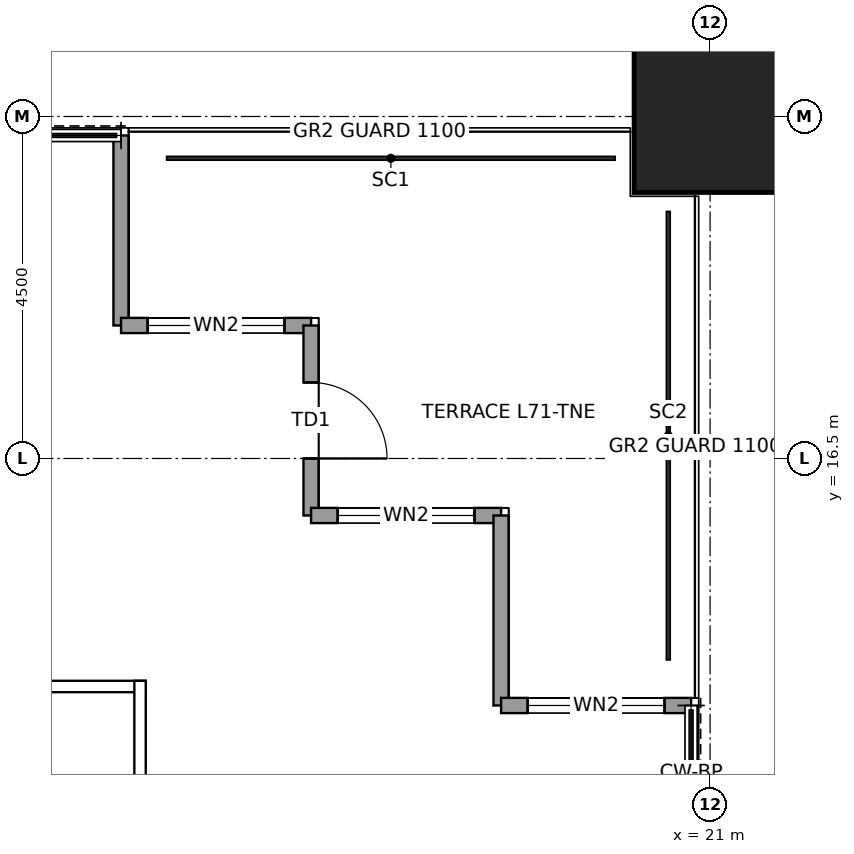
"""IFC4 building model, lengths in metres.
Left out: names, types, materials, properties, quantities, classifications, styles, units other than length and angle.
Written with IfcOpenShell. Run it as: python <this file> out.ifc"""

import sys

from ifc_helpers import new_model, si_unit, direction, frame, frame_2d, origin, origin_2d, place, context, subcontext, project, spatial, rectangle, hollow_rectangle, extrude, element, fill, save


model = new_model("IFC4")
c1 = context("Model", 3, precision=1e-05, world=origin(), true_north=direction((0.0, 1.0)))
c2 = subcontext(c1, "Body", "Model", "MODEL_VIEW")
j1 = project(units=[si_unit("LENGTHUNIT", "METRE"), si_unit("PLANEANGLEUNIT", "RADIAN")], contexts=[c1])
p1 = place(None, origin())
s1 = spatial("IfcSite", under=j1, at=p1, CompositionType="ELEMENT")
p2 = place(p1, origin())
s2 = spatial("IfcBuilding", under=s1, at=p2, CompositionType="ELEMENT")
p3 = place(p2, frame((0.0, 0.0, 319.9)))
s3 = spatial("IfcBuildingStorey", under=s2, at=p3, CompositionType="ELEMENT", Elevation=319.9)
p4 = place(p3, frame((21.0, 21.0, 0.0), z_axis=(0.0, 0.0, 1.0), x_axis=(1.0, 0.0, 0.0)))
e1 = element("IfcColumn", 1, at=p4, inside=s3, PredefinedType="COLUMN", context=c2, shape_type="SweptSolid", body=[
    extrude(hollow_rectangle(XDim=2.0, YDim=2.0, WallThickness=0.095, at=origin_2d()), origin(), (0.0, 0.0, 1.0), 4.0),
])
p5 = place(p3, frame((13.25, 20.75, 0.0), z_axis=(0.0, 0.0, 1.0), x_axis=(0.0, -1.0, 0.0)))
e2 = element("IfcWall", 2, at=p5, inside=s3, PredefinedType="SOLIDWALL", context=c2, shape_type="SweptSolid", body=[
    extrude(rectangle(XDim=2.5, YDim=0.2, at=frame_2d((1.25, 0.0))), origin(), (0.0, 0.0, 1.0), 3.85),
])
p6 = place(p3, frame((13.25, 18.25, 0.0), z_axis=(0.0, 0.0, 1.0), x_axis=(1.0, 0.0, 0.0)))
e3 = element("IfcWall", 3, at=p6, inside=s3, PredefinedType="SOLIDWALL", context=c2, shape_type="SweptSolid", body=[
    extrude(rectangle(XDim=2.5, YDim=0.2, at=frame_2d((1.25, 0.0))), origin(), (0.0, 0.0, 1.0), 3.85),
])
p7 = place(p6, frame((0.35, 0.0, 0.3)))
e4 = element("IfcOpeningElement", 4, at=p7, cuts=e3, PredefinedType="OPENING", context=c2, shape_type="SweptSolid", body=[
    extrude(rectangle(XDim=1.8, YDim=2.4, at=frame_2d((0.9, 1.2))), frame((0.0, 0.11, 0.0), z_axis=(0.0, -1.0, 0.0), x_axis=(1.0, 0.0, 0.0)), (0.0, 0.0, 1.0), 0.22),
])
p8 = place(p3, frame((15.75, 18.25, 0.0), z_axis=(0.0, 0.0, 1.0), x_axis=(0.0, -1.0, 0.0)))
e5 = element("IfcWall", 5, at=p8, inside=s3, PredefinedType="SOLIDWALL", context=c2, shape_type="SweptSolid", body=[
    extrude(rectangle(XDim=2.5, YDim=0.2, at=frame_2d((1.25, 0.0))), origin(), (0.0, 0.0, 1.0), 3.317),
])
p9 = place(p8, frame((0.75, 0.0, 0.0)))
e6 = element("IfcOpeningElement", 6, at=p9, cuts=e5, PredefinedType="OPENING", context=c2, shape_type="SweptSolid", body=[
    extrude(rectangle(XDim=1.0, YDim=2.4, at=frame_2d((0.5, 1.2))), frame((0.0, 0.11, 0.0), z_axis=(0.0, -1.0, 0.0), x_axis=(1.0, 0.0, 0.0)), (0.0, 0.0, 1.0), 0.22),
])
p10 = place(p3, frame((15.75, 15.75, 0.0), z_axis=(0.0, 0.0, 1.0), x_axis=(1.0, 0.0, 0.0)))
e7 = element("IfcWall", 7, at=p10, inside=s3, PredefinedType="SOLIDWALL", context=c2, shape_type="SweptSolid", body=[
    extrude(rectangle(XDim=2.5, YDim=0.2, at=frame_2d((1.25, 0.0))), origin(), (0.0, 0.0, 1.0), 3.85),
])
p11 = place(p10, frame((0.35, 0.0, 0.3)))
e8 = element("IfcOpeningElement", 8, at=p11, cuts=e7, PredefinedType="OPENING", context=c2, shape_type="SweptSolid", body=[
    extrude(rectangle(XDim=1.8, YDim=2.4, at=frame_2d((0.9, 1.2))), frame((0.0, 0.11, 0.0), z_axis=(0.0, -1.0, 0.0), x_axis=(1.0, 0.0, 0.0)), (0.0, 0.0, 1.0), 0.22),
])
p12 = place(p3, frame((18.25, 15.75, 0.0), z_axis=(0.0, 0.0, 1.0), x_axis=(0.0, -1.0, 0.0)))
e9 = element("IfcWall", 9, at=p12, inside=s3, PredefinedType="SOLIDWALL", context=c2, shape_type="SweptSolid", body=[
    extrude(rectangle(XDim=2.5, YDim=0.2, at=frame_2d((1.25, 0.0))), origin(), (0.0, 0.0, 1.0), 3.85),
])
p13 = place(p3, frame((18.25, 13.25, 0.0), z_axis=(0.0, 0.0, 1.0), x_axis=(1.0, 0.0, 0.0)))
e10 = element("IfcWall", 10, at=p13, inside=s3, PredefinedType="SOLIDWALL", context=c2, shape_type="SweptSolid", body=[
    extrude(rectangle(XDim=2.5, YDim=0.2, at=frame_2d((1.25, 0.0))), origin(), (0.0, 0.0, 1.0), 3.85),
])
p14 = place(p13, frame((0.35, 0.0, 0.3)))
e11 = element("IfcOpeningElement", 11, at=p14, cuts=e10, PredefinedType="OPENING", context=c2, shape_type="SweptSolid", body=[
    extrude(rectangle(XDim=1.8, YDim=2.4, at=frame_2d((0.9, 1.2))), frame((0.0, 0.11, 0.0), z_axis=(0.0, -1.0, 0.0), x_axis=(1.0, 0.0, 0.0)), (0.0, 0.0, 1.0), 0.22),
])
p15 = place(p3, frame((4.925, 13.5, 0.0), z_axis=(0.0, 0.0, 1.0), x_axis=(1.0, 0.0, 0.0)))
e12 = element("IfcWall", 12, at=p15, inside=s3, PredefinedType="PARTITIONING", context=c2, shape_type="SweptSolid", body=[
    extrude(rectangle(XDim=8.65, YDim=0.15, at=frame_2d((4.325, 0.0))), origin(), (0.0, 0.0, 1.0), 3.85),
])
p16 = place(p3, frame((13.5, 4.925, 0.0), z_axis=(0.0, 0.0, 1.0), x_axis=(0.0, 1.0, 0.0)))
e13 = element("IfcWall", 13, at=p16, inside=s3, PredefinedType="PARTITIONING", context=c2, shape_type="SweptSolid", body=[
    extrude(rectangle(XDim=8.65, YDim=0.15, at=frame_2d((4.325, 0.0))), origin(), (0.0, 0.0, 1.0), 3.85),
])
p17 = place(p16, frame((3.825, 0.0, 0.0)))
e14 = element("IfcOpeningElement", 14, at=p17, cuts=e13, PredefinedType="OPENING", context=c2, shape_type="SweptSolid", body=[
    extrude(rectangle(XDim=1.0, YDim=2.4, at=frame_2d((0.5, 1.2))), frame((0.0, 0.085, 0.0), z_axis=(0.0, -1.0, 0.0), x_axis=(1.0, 0.0, 0.0)), (0.0, 0.0, 1.0), 0.17),
])
p18 = place(p7, origin())
e15 = element("IfcWindow", 15, at=p18, inside=s3, PartitioningType="SINGLE_PANEL", PredefinedType="WINDOW", context=c2, shape_type="SweptSolid", body=[
    extrude(rectangle(XDim=1.8, YDim=2.4, at=frame_2d((0.9, 1.2))), frame((0.0, 0.03, 0.0), z_axis=(0.0, -1.0, 0.0), x_axis=(1.0, 0.0, 0.0)), (0.0, 0.0, 1.0), 0.06),
])
fill(e4, e15)
p19 = place(p9, origin())
e16 = element("IfcDoor", 16, at=p19, inside=s3, OperationType="SINGLE_SWING_RIGHT", PredefinedType="DOOR", context=c2, shape_type="SweptSolid", body=[
    extrude(rectangle(XDim=1.0, YDim=2.4, at=frame_2d((0.5, 1.2))), frame((0.0, 0.025, 0.0), z_axis=(0.0, -1.0, 0.0), x_axis=(1.0, 0.0, 0.0)), (0.0, 0.0, 1.0), 0.05),
])
fill(e6, e16)
p20 = place(p11, origin())
e17 = element("IfcWindow", 17, at=p20, inside=s3, PartitioningType="SINGLE_PANEL", PredefinedType="WINDOW", context=c2, shape_type="SweptSolid", body=[
    extrude(rectangle(XDim=1.8, YDim=2.4, at=frame_2d((0.9, 1.2))), frame((0.0, 0.03, 0.0), z_axis=(0.0, -1.0, 0.0), x_axis=(1.0, 0.0, 0.0)), (0.0, 0.0, 1.0), 0.06),
])
fill(e8, e17)
p21 = place(p14, origin())
e18 = element("IfcWindow", 18, at=p21, inside=s3, PartitioningType="SINGLE_PANEL", PredefinedType="WINDOW", context=c2, shape_type="SweptSolid", body=[
    extrude(rectangle(XDim=1.8, YDim=2.4, at=frame_2d((0.9, 1.2))), frame((0.0, 0.03, 0.0), z_axis=(0.0, -1.0, 0.0), x_axis=(1.0, 0.0, 0.0)), (0.0, 0.0, 1.0), 0.06),
])
fill(e11, e18)
save(model, sys.argv[1])
